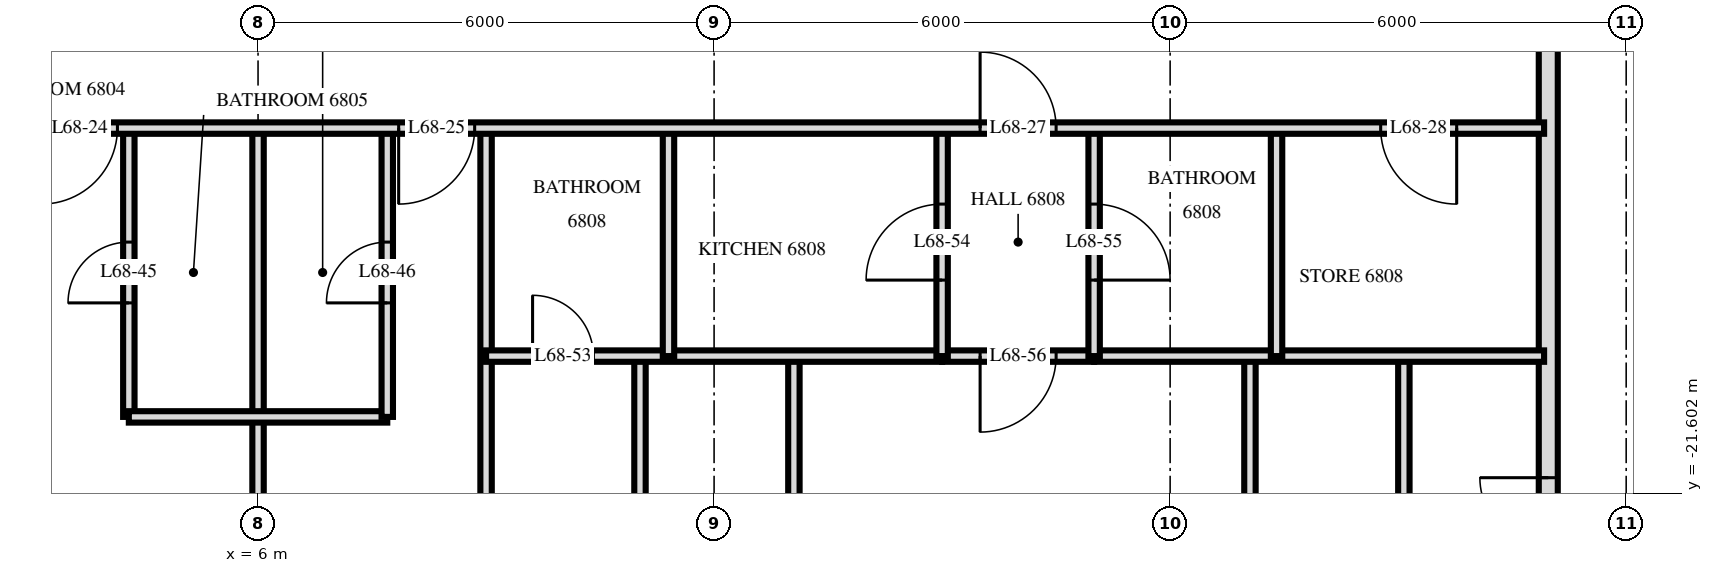
"""IFC4 building model, lengths in metres.
Left out: names, types, materials, properties, quantities, classifications, styles, units other than length and angle.
Written with IfcOpenShell. Run it as: python <this file> out.ifc"""

import sys

from ifc_helpers import new_model, si_unit, direction, frame, frame_2d, origin, place, context, subcontext, project, spatial, rectangle, extrude, element, fill, save


model = new_model("IFC4")
c1 = context("Model", 3, precision=1e-05, world=origin(), true_north=direction((0.0, 1.0)))
c2 = subcontext(c1, "Body", "Model", "MODEL_VIEW")
j1 = project(units=[si_unit("LENGTHUNIT", "METRE"), si_unit("PLANEANGLEUNIT", "RADIAN")], contexts=[c1])
p1 = place(None, origin())
s1 = spatial("IfcSite", under=j1, at=p1, CompositionType="ELEMENT")
p2 = place(p1, origin())
s2 = spatial("IfcBuilding", under=s1, at=p2, CompositionType="ELEMENT")
p3 = place(p2, frame((0.0, 0.0, 259.6)))
s3 = spatial("IfcBuildingStorey", under=s2, at=p3, CompositionType="ELEMENT", Elevation=259.6)
p4 = place(p3, frame((22.975, -29.275, 0.0), z_axis=(0.0, 0.0, 1.0), x_axis=(0.0, 1.0, 0.0)))
e1 = element("IfcWall", 1, at=p4, inside=s3, PredefinedType="SOLIDWALL", context=c2, shape_type="SweptSolid", body=[
    extrude(rectangle(XDim=25.951, YDim=0.25, at=frame_2d((12.975, 0.0))), origin(), (0.0, 0.0, 1.0), 3.22),
])
p5 = place(p4, frame((0.575, 0.0, 0.0)))
e2 = element("IfcOpeningElement", 2, at=p5, cuts=e1, PredefinedType="OPENING", context=c2, shape_type="SweptSolid", body=[
    extrude(rectangle(XDim=1.8, YDim=2.4, at=frame_2d((0.9, 1.2))), frame((0.0, 0.135, 0.0), z_axis=(0.0, -1.0, 0.0), x_axis=(1.0, 0.0, 0.0)), (0.0, 0.0, 1.0), 0.27),
])
p6 = place(p4, frame((3.325, 0.0, 0.9)))
e3 = element("IfcOpeningElement", 3, at=p6, cuts=e1, PredefinedType="OPENING", context=c2, shape_type="SweptSolid", body=[
    extrude(rectangle(XDim=1.8, YDim=1.5, at=frame_2d((0.9, 0.75))), frame((0.0, 0.135, 0.0), z_axis=(0.0, -1.0, 0.0), x_axis=(1.0, 0.0, 0.0)), (0.0, 0.0, 1.0), 0.27),
])
p7 = place(p4, frame((6.075, 0.0, 0.0)))
e4 = element("IfcOpeningElement", 4, at=p7, cuts=e1, PredefinedType="OPENING", context=c2, shape_type="SweptSolid", body=[
    extrude(rectangle(XDim=1.8, YDim=2.4, at=frame_2d((0.9, 1.2))), frame((0.0, 0.135, 0.0), z_axis=(0.0, -1.0, 0.0), x_axis=(1.0, 0.0, 0.0)), (0.0, 0.0, 1.0), 0.27),
])
p8 = place(p4, frame((14.875, 0.0, 0.0)))
e5 = element("IfcOpeningElement", 5, at=p8, cuts=e1, PredefinedType="OPENING", context=c2, shape_type="SweptSolid", body=[
    extrude(rectangle(XDim=1.8, YDim=2.4, at=frame_2d((0.9, 1.2))), frame((0.0, 0.135, 0.0), z_axis=(0.0, -1.0, 0.0), x_axis=(1.0, 0.0, 0.0)), (0.0, 0.0, 1.0), 0.27),
])
p9 = place(p4, frame((17.575, 0.0, 0.9)))
e6 = element("IfcOpeningElement", 6, at=p9, cuts=e1, PredefinedType="OPENING", context=c2, shape_type="SweptSolid", body=[
    extrude(rectangle(XDim=2.4, YDim=1.5, at=frame_2d((1.2, 0.75))), frame((0.0, 0.135, 0.0), z_axis=(0.0, -1.0, 0.0), x_axis=(1.0, 0.0, 0.0)), (0.0, 0.0, 1.0), 0.27),
])
p10 = place(p4, frame((22.925, 0.0, 0.0)))
e7 = element("IfcOpeningElement", 7, at=p10, cuts=e1, PredefinedType="OPENING", context=c2, shape_type="SweptSolid", body=[
    extrude(rectangle(XDim=1.8, YDim=2.4, at=frame_2d((0.9, 1.2))), frame((0.0, 0.135, 0.0), z_axis=(0.0, -1.0, 0.0), x_axis=(1.0, 0.0, 0.0)), (0.0, 0.0, 1.0), 0.27),
])
p11 = place(p3, frame((21.075, -32.666, 0.0), z_axis=(0.0, 0.0, 1.0), x_axis=(0.0, 1.0, 0.0)))
e8 = element("IfcWall", 8, at=p11, inside=s3, PredefinedType="PARTITIONING", context=c2, shape_type="SweptSolid", body=[
    extrude(rectangle(XDim=12.866, YDim=0.15, at=frame_2d((6.433, 0.0))), origin(), (0.0, 0.0, 1.0), 3.22),
])
p12 = place(p11, frame((5.846, 0.0, 0.0)))
e9 = element("IfcOpeningElement", 9, at=p12, cuts=e8, PredefinedType="OPENING", context=c2, shape_type="SweptSolid", body=[
    extrude(rectangle(XDim=0.9, YDim=2.1, at=frame_2d((0.45, 1.05))), frame((0.0, 0.085, 0.0), z_axis=(0.0, -1.0, 0.0), x_axis=(1.0, 0.0, 0.0)), (0.0, 0.0, 1.0), 0.17),
])
p13 = place(p3, frame((19.4, -19.8, 0.0), z_axis=(0.0, 0.0, 1.0), x_axis=(0.0, 1.0, 0.0)))
e10 = element("IfcWall", 10, at=p13, inside=s3, PredefinedType="PARTITIONING", context=c2, shape_type="SweptSolid", body=[
    extrude(rectangle(XDim=3.0, YDim=0.15, at=frame_2d((1.5, 0.0))), origin(), (0.0, 0.0, 1.0), 3.22),
])
p14 = place(p3, frame((19.05, -33.527, 0.0), z_axis=(0.0, 0.0, 1.0), x_axis=(0.0, 1.0, 0.0)))
e11 = element("IfcWall", 11, at=p14, inside=s3, PredefinedType="PARTITIONING", context=c2, shape_type="SweptSolid", body=[
    extrude(rectangle(XDim=13.727, YDim=0.15, at=frame_2d((6.864, 0.0))), origin(), (0.0, 0.0, 1.0), 3.22),
])
p15 = place(p14, frame((6.307, 0.0, 0.0)))
e12 = element("IfcOpeningElement", 12, at=p15, cuts=e11, PredefinedType="OPENING", context=c2, shape_type="SweptSolid", body=[
    extrude(rectangle(XDim=0.9, YDim=2.1, at=frame_2d((0.45, 1.05))), frame((0.0, 0.085, 0.0), z_axis=(0.0, -1.0, 0.0), x_axis=(1.0, 0.0, 0.0)), (0.0, 0.0, 1.0), 0.17),
])
p16 = place(p3, frame((17.0, -19.8, 0.0), z_axis=(0.0, 0.0, 1.0), x_axis=(0.0, 1.0, 0.0)))
e13 = element("IfcWall", 13, at=p16, inside=s3, PredefinedType="PARTITIONING", context=c2, shape_type="SweptSolid", body=[
    extrude(rectangle(XDim=3.0, YDim=0.15, at=frame_2d((1.5, 0.0))), origin(), (0.0, 0.0, 1.0), 3.22),
])
p17 = place(p16, frame((1.0, 0.0, 0.0)))
e14 = element("IfcOpeningElement", 14, at=p17, cuts=e13, PredefinedType="OPENING", context=c2, shape_type="SweptSolid", body=[
    extrude(rectangle(XDim=1.0, YDim=2.1, at=frame_2d((0.5, 1.05))), frame((0.0, 0.085, 0.0), z_axis=(0.0, -1.0, 0.0), x_axis=(1.0, 0.0, 0.0)), (0.0, 0.0, 1.0), 0.17),
])
p18 = place(p3, frame((15.0, -19.8, 0.0), z_axis=(0.0, 0.0, 1.0), x_axis=(0.0, 1.0, 0.0)))
e15 = element("IfcWall", 15, at=p18, inside=s3, PredefinedType="PARTITIONING", context=c2, shape_type="SweptSolid", body=[
    extrude(rectangle(XDim=3.0, YDim=0.15, at=frame_2d((1.5, 0.0))), origin(), (0.0, 0.0, 1.0), 3.22),
])
p19 = place(p18, frame((1.0, 0.0, 0.0)))
e16 = element("IfcOpeningElement", 16, at=p19, cuts=e15, PredefinedType="OPENING", context=c2, shape_type="SweptSolid", body=[
    extrude(rectangle(XDim=1.0, YDim=2.1, at=frame_2d((0.5, 1.05))), frame((0.0, 0.085, 0.0), z_axis=(0.0, -1.0, 0.0), x_axis=(1.0, 0.0, 0.0)), (0.0, 0.0, 1.0), 0.17),
])
p20 = place(p3, frame((13.05, -33.62, 0.0), z_axis=(0.0, 0.0, 1.0), x_axis=(0.0, 1.0, 0.0)))
e17 = element("IfcWall", 17, at=p20, inside=s3, PredefinedType="PARTITIONING", context=c2, shape_type="SweptSolid", body=[
    extrude(rectangle(XDim=13.82, YDim=0.15, at=frame_2d((6.91, 0.0))), origin(), (0.0, 0.0, 1.0), 3.22),
])
p21 = place(p20, frame((6.39, 0.0, 0.0)))
e18 = element("IfcOpeningElement", 18, at=p21, cuts=e17, PredefinedType="OPENING", context=c2, shape_type="SweptSolid", body=[
    extrude(rectangle(XDim=0.9, YDim=2.1, at=frame_2d((0.45, 1.05))), frame((0.0, 0.085, 0.0), z_axis=(0.0, -1.0, 0.0), x_axis=(1.0, 0.0, 0.0)), (0.0, 0.0, 1.0), 0.17),
])
p22 = place(p3, frame((11.4, -19.8, 0.0), z_axis=(0.0, 0.0, 1.0), x_axis=(0.0, 1.0, 0.0)))
e19 = element("IfcWall", 19, at=p22, inside=s3, PredefinedType="PARTITIONING", context=c2, shape_type="SweptSolid", body=[
    extrude(rectangle(XDim=3.0, YDim=0.15, at=frame_2d((1.5, 0.0))), origin(), (0.0, 0.0, 1.0), 3.22),
])
p23 = place(p3, frame((11.025, -33.62, 0.0), z_axis=(0.0, 0.0, 1.0), x_axis=(0.0, 1.0, 0.0)))
e20 = element("IfcWall", 20, at=p23, inside=s3, PredefinedType="PARTITIONING", context=c2, shape_type="SweptSolid", body=[
    extrude(rectangle(XDim=13.82, YDim=0.15, at=frame_2d((6.91, 0.0))), origin(), (0.0, 0.0, 1.0), 3.22),
])
p24 = place(p23, frame((6.39, 0.0, 0.0)))
e21 = element("IfcOpeningElement", 21, at=p24, cuts=e20, PredefinedType="OPENING", context=c2, shape_type="SweptSolid", body=[
    extrude(rectangle(XDim=0.9, YDim=2.1, at=frame_2d((0.45, 1.05))), frame((0.0, 0.085, 0.0), z_axis=(0.0, -1.0, 0.0), x_axis=(1.0, 0.0, 0.0)), (0.0, 0.0, 1.0), 0.17),
])
p25 = place(p3, frame((9.0, -33.62, 0.0), z_axis=(0.0, 0.0, 1.0), x_axis=(0.0, 1.0, 0.0)))
e22 = element("IfcWall", 22, at=p25, inside=s3, PredefinedType="PARTITIONING", context=c2, shape_type="SweptSolid", body=[
    extrude(rectangle(XDim=16.82, YDim=0.15, at=frame_2d((8.41, 0.0))), origin(), (0.0, 0.0, 1.0), 3.22),
])
p26 = place(p3, frame((7.7, -20.6, 0.0), z_axis=(0.0, 0.0, 1.0), x_axis=(0.0, 1.0, 0.0)))
e23 = element("IfcWall", 23, at=p26, inside=s3, PredefinedType="PARTITIONING", context=c2, shape_type="SweptSolid", body=[
    extrude(rectangle(XDim=3.8, YDim=0.15, at=frame_2d((1.9, 0.0))), origin(), (0.0, 0.0, 1.0), 3.22),
])
p27 = place(p26, frame((1.5, 0.0, 0.0)))
e24 = element("IfcOpeningElement", 24, at=p27, cuts=e23, PredefinedType="OPENING", context=c2, shape_type="SweptSolid", body=[
    extrude(rectangle(XDim=0.8, YDim=2.1, at=frame_2d((0.4, 1.05))), frame((0.0, 0.085, 0.0), z_axis=(0.0, -1.0, 0.0), x_axis=(1.0, 0.0, 0.0)), (0.0, 0.0, 1.0), 0.17),
])
p28 = place(p3, frame((6.0, -33.62, 0.0), z_axis=(0.0, 0.0, 1.0), x_axis=(0.0, 1.0, 0.0)))
e25 = element("IfcWall", 25, at=p28, inside=s3, PredefinedType="PARTITIONING", context=c2, shape_type="SweptSolid", body=[
    extrude(rectangle(XDim=16.82, YDim=0.15, at=frame_2d((8.41, 0.0))), origin(), (0.0, 0.0, 1.0), 3.22),
])
p29 = place(p3, frame((4.3, -20.6, 0.0), z_axis=(0.0, 0.0, 1.0), x_axis=(0.0, 1.0, 0.0)))
e26 = element("IfcWall", 26, at=p29, inside=s3, PredefinedType="PARTITIONING", context=c2, shape_type="SweptSolid", body=[
    extrude(rectangle(XDim=3.8, YDim=0.15, at=frame_2d((1.9, 0.0))), origin(), (0.0, 0.0, 1.0), 3.22),
])
p30 = place(p29, frame((1.5, 0.0, 0.0)))
e27 = element("IfcOpeningElement", 27, at=p30, cuts=e26, PredefinedType="OPENING", context=c2, shape_type="SweptSolid", body=[
    extrude(rectangle(XDim=0.8, YDim=2.1, at=frame_2d((0.4, 1.05))), frame((0.0, 0.085, 0.0), z_axis=(0.0, -1.0, 0.0), x_axis=(1.0, 0.0, 0.0)), (0.0, 0.0, 1.0), 0.17),
])
p31 = place(p3, frame((4.3, -20.6, 0.0), z_axis=(0.0, 0.0, 1.0), x_axis=(1.0, 0.0, 0.0)))
e28 = element("IfcWall", 28, at=p31, inside=s3, PredefinedType="PARTITIONING", context=c2, shape_type="SweptSolid", body=[
    extrude(rectangle(XDim=3.4, YDim=0.15, at=frame_2d((1.7, 0.0))), origin(), (0.0, 0.0, 1.0), 3.22),
])
p32 = place(p3, frame((15.0, -19.8, 0.0), z_axis=(0.0, 0.0, 1.0), x_axis=(1.0, 0.0, 0.0)))
e29 = element("IfcWall", 29, at=p32, inside=s3, PredefinedType="PARTITIONING", context=c2, shape_type="SweptSolid", body=[
    extrude(rectangle(XDim=2.0, YDim=0.15, at=frame_2d((1.0, 0.0))), origin(), (0.0, 0.0, 1.0), 3.22),
])
p33 = place(p32, frame((0.5, 0.0, 0.0)))
e30 = element("IfcOpeningElement", 30, at=p33, cuts=e29, PredefinedType="OPENING", context=c2, shape_type="SweptSolid", body=[
    extrude(rectangle(XDim=1.0, YDim=2.1, at=frame_2d((0.5, 1.05))), frame((0.0, 0.085, 0.0), z_axis=(0.0, -1.0, 0.0), x_axis=(1.0, 0.0, 0.0)), (0.0, 0.0, 1.0), 0.17),
])
p34 = place(p3, frame((9.0, -19.8, 0.0), z_axis=(0.0, 0.0, 1.0), x_axis=(1.0, 0.0, 0.0)))
e31 = element("IfcWall", 31, at=p34, inside=s3, PredefinedType="PARTITIONING", context=c2, shape_type="SweptSolid", body=[
    extrude(rectangle(XDim=6.0, YDim=0.15, at=frame_2d((3.0, 0.0))), origin(), (0.0, 0.0, 1.0), 3.22),
])
p35 = place(p34, frame((0.612, 0.0, 0.0)))
e32 = element("IfcOpeningElement", 32, at=p35, cuts=e31, PredefinedType="OPENING", context=c2, shape_type="SweptSolid", body=[
    extrude(rectangle(XDim=0.8, YDim=2.1, at=frame_2d((0.4, 1.05))), frame((0.0, 0.085, 0.0), z_axis=(0.0, -1.0, 0.0), x_axis=(1.0, 0.0, 0.0)), (0.0, 0.0, 1.0), 0.17),
])
p36 = place(p3, frame((17.0, -19.8, 0.0), z_axis=(0.0, 0.0, 1.0), x_axis=(1.0, 0.0, 0.0)))
e33 = element("IfcWall", 33, at=p36, inside=s3, PredefinedType="PARTITIONING", context=c2, shape_type="SweptSolid", body=[
    extrude(rectangle(XDim=5.92, YDim=0.15, at=frame_2d((2.96, 0.0))), origin(), (0.0, 0.0, 1.0), 3.22),
])
p37 = place(p3, frame((-22.92, -16.8, 0.0), z_axis=(0.0, 0.0, 1.0), x_axis=(1.0, 0.0, 0.0)))
e34 = element("IfcWall", 34, at=p37, inside=s3, PredefinedType="PARTITIONING", context=c2, shape_type="SweptSolid", body=[
    extrude(rectangle(XDim=45.84, YDim=0.15, at=frame_2d((22.92, 0.0))), origin(), (0.0, 0.0, 1.0), 3.22),
])
p38 = place(p37, frame((15.67, 0.0, 0.0)))
e35 = element("IfcOpeningElement", 35, at=p38, cuts=e34, PredefinedType="OPENING", context=c2, shape_type="SweptSolid", body=[
    extrude(rectangle(XDim=1.0, YDim=2.1, at=frame_2d((0.5, 1.05))), frame((0.0, 0.085, 0.0), z_axis=(0.0, -1.0, 0.0), x_axis=(1.0, 0.0, 0.0)), (0.0, 0.0, 1.0), 0.17),
])
p39 = place(p37, frame((18.77, 0.0, 0.0)))
e36 = element("IfcOpeningElement", 36, at=p39, cuts=e34, PredefinedType="OPENING", context=c2, shape_type="SweptSolid", body=[
    extrude(rectangle(XDim=1.0, YDim=2.1, at=frame_2d((0.5, 1.05))), frame((0.0, 0.085, 0.0), z_axis=(0.0, -1.0, 0.0), x_axis=(1.0, 0.0, 0.0)), (0.0, 0.0, 1.0), 0.17),
])
p40 = place(p37, frame((20.07, 0.0, 0.0)))
e37 = element("IfcOpeningElement", 37, at=p40, cuts=e34, PredefinedType="OPENING", context=c2, shape_type="SweptSolid", body=[
    extrude(rectangle(XDim=1.0, YDim=2.1, at=frame_2d((0.5, 1.05))), frame((0.0, 0.085, 0.0), z_axis=(0.0, -1.0, 0.0), x_axis=(1.0, 0.0, 0.0)), (0.0, 0.0, 1.0), 0.17),
])
p41 = place(p37, frame((24.77, 0.0, 0.0)))
e38 = element("IfcOpeningElement", 38, at=p41, cuts=e34, PredefinedType="OPENING", context=c2, shape_type="SweptSolid", body=[
    extrude(rectangle(XDim=1.0, YDim=2.1, at=frame_2d((0.5, 1.05))), frame((0.0, 0.085, 0.0), z_axis=(0.0, -1.0, 0.0), x_axis=(1.0, 0.0, 0.0)), (0.0, 0.0, 1.0), 0.17),
])
p42 = place(p37, frame((26.07, 0.0, 0.0)))
e39 = element("IfcOpeningElement", 39, at=p42, cuts=e34, PredefinedType="OPENING", context=c2, shape_type="SweptSolid", body=[
    extrude(rectangle(XDim=1.0, YDim=2.1, at=frame_2d((0.5, 1.05))), frame((0.0, 0.085, 0.0), z_axis=(0.0, -1.0, 0.0), x_axis=(1.0, 0.0, 0.0)), (0.0, 0.0, 1.0), 0.17),
])
p43 = place(p37, frame((30.77, 0.0, 0.0)))
e40 = element("IfcOpeningElement", 40, at=p43, cuts=e34, PredefinedType="OPENING", context=c2, shape_type="SweptSolid", body=[
    extrude(rectangle(XDim=1.0, YDim=2.1, at=frame_2d((0.5, 1.05))), frame((0.0, 0.085, 0.0), z_axis=(0.0, -1.0, 0.0), x_axis=(1.0, 0.0, 0.0)), (0.0, 0.0, 1.0), 0.17),
])
p44 = place(p37, frame((7.02, 0.0, 0.0)))
e41 = element("IfcOpeningElement", 41, at=p44, cuts=e34, PredefinedType="OPENING", context=c2, shape_type="SweptSolid", body=[
    extrude(rectangle(XDim=1.0, YDim=2.1, at=frame_2d((0.5, 1.05))), frame((0.0, 0.085, 0.0), z_axis=(0.0, -1.0, 0.0), x_axis=(1.0, 0.0, 0.0)), (0.0, 0.0, 1.0), 0.17),
])
p45 = place(p37, frame((38.42, 0.0, 0.0)))
e42 = element("IfcOpeningElement", 42, at=p45, cuts=e34, PredefinedType="OPENING", context=c2, shape_type="SweptSolid", body=[
    extrude(rectangle(XDim=1.0, YDim=2.1, at=frame_2d((0.5, 1.05))), frame((0.0, 0.085, 0.0), z_axis=(0.0, -1.0, 0.0), x_axis=(1.0, 0.0, 0.0)), (0.0, 0.0, 1.0), 0.17),
])
p46 = place(p37, frame((43.69, 0.0, 0.0)))
e43 = element("IfcOpeningElement", 43, at=p46, cuts=e34, PredefinedType="OPENING", context=c2, shape_type="SweptSolid", body=[
    extrude(rectangle(XDim=1.0, YDim=2.1, at=frame_2d((0.5, 1.05))), frame((0.0, 0.085, 0.0), z_axis=(0.0, -1.0, 0.0), x_axis=(1.0, 0.0, 0.0)), (0.0, 0.0, 1.0), 0.17),
])
p47 = place(p7, origin())
e44 = element("IfcDoor", 44, at=p47, inside=s3, OperationType="DOUBLE_DOOR_SINGLE_SWING", PredefinedType="DOOR", context=c2, shape_type="SweptSolid", body=[
    extrude(rectangle(XDim=1.8, YDim=2.4, at=frame_2d((0.9, 1.2))), frame((0.0, 0.025, 0.0), z_axis=(0.0, -1.0, 0.0), x_axis=(1.0, 0.0, 0.0)), (0.0, 0.0, 1.0), 0.05),
])
fill(e4, e44)
p48 = place(p42, frame((0.5, 0.0, 0.0), z_axis=(0.0, 0.0, 1.0), x_axis=(-1.0, 0.0, 0.0)))
e45 = element("IfcDoor", 45, at=p48, inside=s3, OperationType="SINGLE_SWING_LEFT", PredefinedType="DOOR", context=c2, shape_type="SweptSolid", body=[
    extrude(rectangle(XDim=1.0, YDim=2.1, at=frame_2d((0.0, 1.05))), frame((0.0, -0.025, 0.0), z_axis=(0.0, 1.0, 0.0), x_axis=(-1.0, 0.0, 0.0)), (0.0, 0.0, 1.0), 0.05),
])
fill(e39, e45)
p49 = place(p43, frame((0.5, 0.0, 0.0), z_axis=(0.0, 0.0, 1.0), x_axis=(-1.0, 0.0, 0.0)))
e46 = element("IfcDoor", 46, at=p49, inside=s3, OperationType="SINGLE_SWING_LEFT", PredefinedType="DOOR", context=c2, shape_type="SweptSolid", body=[
    extrude(rectangle(XDim=1.0, YDim=2.1, at=frame_2d((0.0, 1.05))), frame((0.0, -0.025, 0.0), z_axis=(0.0, 1.0, 0.0), x_axis=(-1.0, 0.0, 0.0)), (0.0, 0.0, 1.0), 0.05),
])
fill(e40, e46)
p50 = place(p45, origin())
e47 = element("IfcDoor", 47, at=p50, inside=s3, OperationType="SINGLE_SWING_RIGHT", PredefinedType="DOOR", context=c2, shape_type="SweptSolid", body=[
    extrude(rectangle(XDim=1.0, YDim=2.1, at=frame_2d((0.5, 1.05))), frame((0.0, 0.025, 0.0), z_axis=(0.0, -1.0, 0.0), x_axis=(1.0, 0.0, 0.0)), (0.0, 0.0, 1.0), 0.05),
])
fill(e42, e47)
p51 = place(p46, frame((0.5, 0.0, 0.0), z_axis=(0.0, 0.0, 1.0), x_axis=(-1.0, 0.0, 0.0)))
e48 = element("IfcDoor", 48, at=p51, inside=s3, OperationType="SINGLE_SWING_RIGHT", PredefinedType="DOOR", context=c2, shape_type="SweptSolid", body=[
    extrude(rectangle(XDim=1.0, YDim=2.1, at=frame_2d((0.0, 1.05))), frame((0.0, -0.025, 0.0), z_axis=(0.0, 1.0, 0.0), x_axis=(-1.0, 0.0, 0.0)), (0.0, 0.0, 1.0), 0.05),
])
fill(e43, e48)
p52 = place(p30, origin())
e49 = element("IfcDoor", 49, at=p52, inside=s3, OperationType="SINGLE_SWING_RIGHT", PredefinedType="DOOR", context=c2, shape_type="SweptSolid", body=[
    extrude(rectangle(XDim=0.8, YDim=2.1, at=frame_2d((0.4, 1.05))), frame((0.0, 0.025, 0.0), z_axis=(0.0, -1.0, 0.0), x_axis=(1.0, 0.0, 0.0)), (0.0, 0.0, 1.0), 0.05),
])
fill(e27, e49)
p53 = place(p27, origin())
e50 = element("IfcDoor", 50, at=p53, inside=s3, OperationType="SINGLE_SWING_RIGHT", PredefinedType="DOOR", context=c2, shape_type="SweptSolid", body=[
    extrude(rectangle(XDim=0.8, YDim=2.1, at=frame_2d((0.4, 1.05))), frame((0.0, 0.025, 0.0), z_axis=(0.0, -1.0, 0.0), x_axis=(1.0, 0.0, 0.0)), (0.0, 0.0, 1.0), 0.05),
])
fill(e24, e50)
p54 = place(p35, origin())
e51 = element("IfcDoor", 51, at=p54, inside=s3, OperationType="SINGLE_SWING_RIGHT", PredefinedType="DOOR", context=c2, shape_type="SweptSolid", body=[
    extrude(rectangle(XDim=0.8, YDim=2.1, at=frame_2d((0.4, 1.05))), frame((0.0, 0.025, 0.0), z_axis=(0.0, -1.0, 0.0), x_axis=(1.0, 0.0, 0.0)), (0.0, 0.0, 1.0), 0.05),
])
fill(e32, e51)
p55 = place(p19, origin())
e52 = element("IfcDoor", 52, at=p55, inside=s3, OperationType="SINGLE_SWING_RIGHT", PredefinedType="DOOR", context=c2, shape_type="SweptSolid", body=[
    extrude(rectangle(XDim=1.0, YDim=2.1, at=frame_2d((0.5, 1.05))), frame((0.0, 0.025, 0.0), z_axis=(0.0, -1.0, 0.0), x_axis=(1.0, 0.0, 0.0)), (0.0, 0.0, 1.0), 0.05),
])
fill(e16, e52)
p56 = place(p17, frame((0.5, 0.0, 0.0), z_axis=(0.0, 0.0, 1.0), x_axis=(-1.0, 0.0, 0.0)))
e53 = element("IfcDoor", 53, at=p56, inside=s3, OperationType="SINGLE_SWING_LEFT", PredefinedType="DOOR", context=c2, shape_type="SweptSolid", body=[
    extrude(rectangle(XDim=1.0, YDim=2.1, at=frame_2d((0.0, 1.05))), frame((0.0, -0.025, 0.0), z_axis=(0.0, 1.0, 0.0), x_axis=(-1.0, 0.0, 0.0)), (0.0, 0.0, 1.0), 0.05),
])
fill(e14, e53)
p57 = place(p33, frame((0.5, 0.0, 0.0), z_axis=(0.0, 0.0, 1.0), x_axis=(-1.0, 0.0, 0.0)))
e54 = element("IfcDoor", 54, at=p57, inside=s3, OperationType="SINGLE_SWING_LEFT", PredefinedType="DOOR", context=c2, shape_type="SweptSolid", body=[
    extrude(rectangle(XDim=1.0, YDim=2.1, at=frame_2d((0.0, 1.05))), frame((0.0, -0.025, 0.0), z_axis=(0.0, 1.0, 0.0), x_axis=(-1.0, 0.0, 0.0)), (0.0, 0.0, 1.0), 0.05),
])
fill(e30, e54)
save(model, sys.argv[1])
